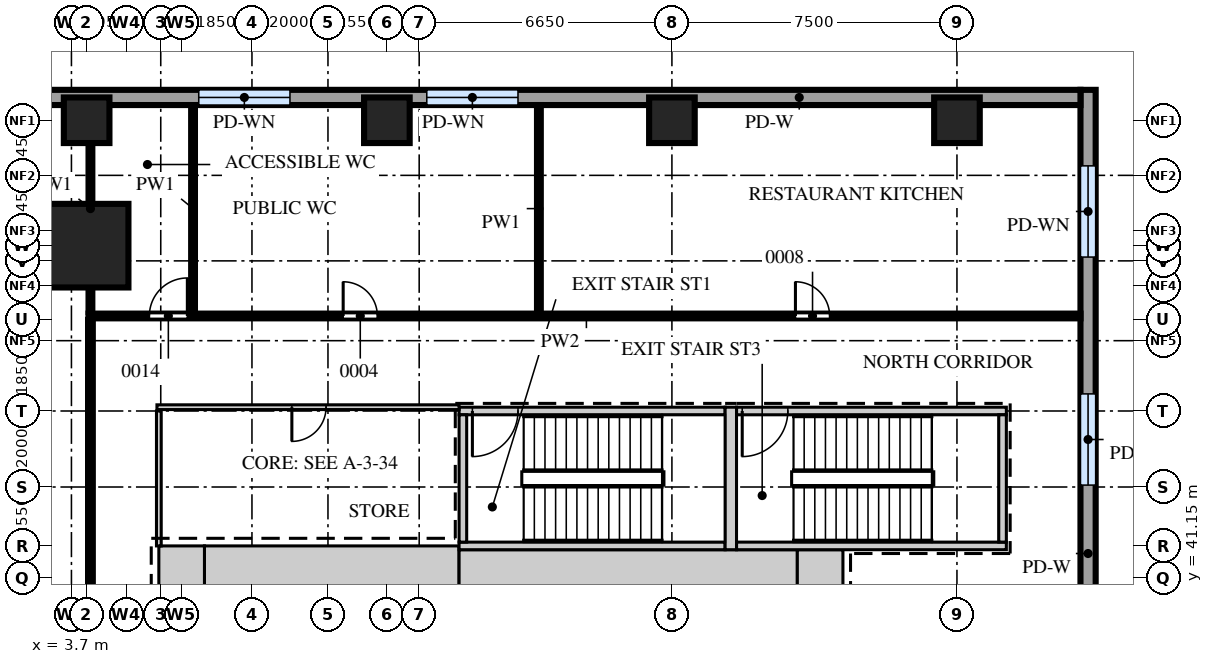
"""IFC4 building model, lengths in metres.
Left out: names, types, materials, properties, quantities, classifications, styles, units other than length and angle.
Written with IfcOpenShell. Run it as: python <this file> out.ifc"""

import sys

from ifc_helpers import new_model, si_unit, direction, frame, frame_2d, origin, origin_2d, place, context, subcontext, project, spatial, rectangle, extrude, source, transform, mapped, element, fill, save


model = new_model("IFC4")
c1 = context("Model", 3, precision=1e-05, world=origin(), true_north=direction((0.0, 1.0)))
c2 = subcontext(c1, "Body", "Model", "MODEL_VIEW")
j1 = project(units=[si_unit("LENGTHUNIT", "METRE"), si_unit("PLANEANGLEUNIT", "RADIAN")], contexts=[c1])
p1 = place(None, origin())
s1 = spatial("IfcSite", under=j1, at=p1, CompositionType="ELEMENT")
p2 = place(p1, origin())
s2 = spatial("IfcBuilding", under=s1, at=p2, CompositionType="ELEMENT")
p3 = place(p2, frame((0.0, 0.0, 18.5)))
s3 = spatial("IfcBuildingStorey", under=s2, at=p3, CompositionType="ELEMENT", Elevation=18.5)
m1 = source(origin(), c2, "Body", "SweptSolid", [
    extrude(rectangle(XDim=6.7, YDim=1.2, at=frame_2d((3.35, 0.0))), origin(), (0.0, 0.0, 1.0), 4.7),
])
p4 = place(p3, frame((7.2, 41.4, 0.0), z_axis=(0.0, 0.0, 1.0), x_axis=(1.0, 0.0, 0.0)))
e1 = element("IfcWall", 1, at=p4, inside=s3, PredefinedType="SHEAR", context=c2, shape_type="MappedRepresentation", body=[
    mapped(m1, transform((0.0, 0.0, 0.0))),
])
m2 = source(origin(), c2, "Body", "SweptSolid", [
    extrude(rectangle(XDim=8.9, YDim=1.1, at=frame_2d((4.45, 0.0))), origin(), (0.0, 0.0, 1.0), 4.7),
])
p5 = place(p3, frame((13.9, 41.35, 0.0), z_axis=(0.0, 0.0, 1.0), x_axis=(1.0, 0.0, 0.0)))
e2 = element("IfcWall", 2, at=p5, inside=s3, PredefinedType="SHEAR", context=c2, shape_type="MappedRepresentation", body=[
    mapped(m2, transform((0.0, 0.0, 0.0))),
])
m3 = source(origin(), c2, "Body", "SweptSolid", [
    extrude(rectangle(XDim=1.2, YDim=1.1, at=frame_2d((0.6, 0.0))), origin(), (0.0, 0.0, 1.0), 4.7),
])
p6 = place(p3, frame((22.8, 41.35, 0.0), z_axis=(0.0, 0.0, 1.0), x_axis=(1.0, 0.0, 0.0)))
e3 = element("IfcWall", 3, at=p6, inside=s3, PredefinedType="SHEAR", context=c2, shape_type="MappedRepresentation", body=[
    mapped(m3, transform((0.0, 0.0, 0.0))),
])
m4 = source(origin(), c2, "Body", "SweptSolid", [
    extrude(rectangle(XDim=1.2, YDim=1.2, at=frame_2d((0.6, 0.0))), origin(), (0.0, 0.0, 1.0), 4.7),
])
p7 = place(p3, frame((6.0, 41.4, 0.0), z_axis=(0.0, 0.0, 1.0), x_axis=(1.0, 0.0, 0.0)))
e4 = element("IfcWall", 4, at=p7, inside=s3, PredefinedType="SHEAR", context=c2, shape_type="MappedRepresentation", body=[
    mapped(m4, transform((0.0, 0.0, 0.0))),
])
m5 = source(origin(), c2, "Body", "SweptSolid", [
    extrude(rectangle(XDim=7.0, YDim=0.2, at=frame_2d((3.5, 0.0))), origin(), (0.0, 0.0, 1.0), 4.7),
])
p8 = place(p3, frame((13.9, 45.55, 0.0), z_axis=(0.0, 0.0, 1.0), x_axis=(1.0, 0.0, 0.0)))
e5 = element("IfcWall", 5, at=p8, inside=s3, PredefinedType="SHEAR", context=c2, shape_type="MappedRepresentation", body=[
    mapped(m5, transform((0.0, 0.0, 0.0))),
])
m6 = source(origin(), c2, "Body", "SweptSolid", [
    extrude(rectangle(XDim=1.2, YDim=2.1, at=frame_2d((0.6, 1.05))), frame((0.0, 0.11, 0.0), z_axis=(0.0, -1.0, 0.0), x_axis=(1.0, 0.0, 0.0)), (0.0, 0.0, 1.0), 0.22),
])
p9 = place(p8, frame((0.35, 0.0, 0.0)))
e6 = element("IfcOpeningElement", 6, at=p9, cuts=e5, PredefinedType="OPENING", context=c2, shape_type="MappedRepresentation", body=[
    mapped(m6, transform((0.0, 0.0, 0.0))),
])
p10 = place(p3, frame((13.9, 42.0, 0.0), z_axis=(0.0, 0.0, 1.0), x_axis=(1.0, 0.0, 0.0)))
e7 = element("IfcWall", 7, at=p10, inside=s3, PredefinedType="SHEAR", context=c2, shape_type="MappedRepresentation", body=[
    mapped(m5, transform((0.0, 0.0, 0.0))),
])
m7 = source(origin(), c2, "Body", "SweptSolid", [
    extrude(rectangle(XDim=7.1, YDim=0.2, at=frame_2d((3.55, 0.0))), origin(), (0.0, 0.0, 1.0), 4.7),
])
p11 = place(p3, frame((21.2, 45.55, 0.0), z_axis=(0.0, 0.0, 1.0), x_axis=(1.0, 0.0, 0.0)))
e8 = element("IfcWall", 8, at=p11, inside=s3, PredefinedType="SHEAR", context=c2, shape_type="MappedRepresentation", body=[
    mapped(m7, transform((0.0, 0.0, 0.0))),
])
p12 = place(p11, frame((0.15, 0.0, 0.0)))
e9 = element("IfcOpeningElement", 9, at=p12, cuts=e8, PredefinedType="OPENING", context=c2, shape_type="MappedRepresentation", body=[
    mapped(m6, transform((0.0, 0.0, 0.0))),
])
p13 = place(p3, frame((21.2, 42.0, 0.0), z_axis=(0.0, 0.0, 1.0), x_axis=(1.0, 0.0, 0.0)))
e10 = element("IfcWall", 10, at=p13, inside=s3, PredefinedType="SHEAR", context=c2, shape_type="MappedRepresentation", body=[
    mapped(m7, transform((0.0, 0.0, 0.0))),
])
m8 = source(origin(), c2, "Body", "SweptSolid", [
    extrude(rectangle(XDim=3.75, YDim=0.3, at=frame_2d((1.875, 0.0))), origin(), (0.0, 0.0, 1.0), 4.7),
])
p14 = place(p3, frame((21.05, 41.9, 0.0), z_axis=(0.0, 0.0, 1.0), x_axis=(0.0, 1.0, 0.0)))
e11 = element("IfcWall", 11, at=p14, inside=s3, PredefinedType="SHEAR", context=c2, shape_type="MappedRepresentation", body=[
    mapped(m8, transform((0.0, 0.0, 0.0))),
])
m9 = source(origin(), c2, "Body", "SweptSolid", [
    extrude(rectangle(XDim=3.35, YDim=0.2, at=frame_2d((1.675, 0.0))), origin(), (0.0, 0.0, 1.0), 4.7),
])
for number, where, z_axis, x_axis in (
    (12, (14.0, 42.1, 0.0), (0.0, 0.0, 1.0), (0.0, 1.0, 0.0)),
    (13, (28.2, 42.1, 0.0), (0.0, 0.0, 1.0), (0.0, 1.0, 0.0)),
):
    element("IfcWall", number, at=place(p3, frame(where, z_axis=z_axis, x_axis=x_axis)), inside=s3, PredefinedType="SHEAR", context=c2, shape_type="MappedRepresentation", body=[
        mapped(m9, transform((0.0, 0.0, 0.0))),
    ])
m10 = source(origin(), c2, "Body", "SweptSolid", [
    extrude(rectangle(XDim=2.2, YDim=2.2, at=origin_2d()), origin(), (0.0, 0.0, 1.0), 4.7),
])
p15 = place(p3, frame((4.1, 49.9, 0.0), z_axis=(0.0, 0.0, 1.0), x_axis=(1.0, 0.0, 0.0)))
e14 = element("IfcColumn", 14, at=p15, inside=s3, PredefinedType="COLUMN", context=c2, shape_type="MappedRepresentation", body=[
    mapped(m10, transform((0.0, 0.0, 0.0))),
])
m11 = source(origin(), c2, "Body", "SweptSolid", [
    extrude(rectangle(XDim=1.2, YDim=1.2, at=origin_2d()), origin(), (0.0, 0.0, 1.0), 4.7),
])
for number, where, z_axis, x_axis in (
    (15, (4.1, 53.2, 0.0), (0.0, 0.0, 1.0), (1.0, 0.0, 0.0)),
    (16, (12.0, 53.2, 0.0), (0.0, 0.0, 1.0), (1.0, 0.0, 0.0)),
    (17, (19.5, 53.2, 0.0), (0.0, 0.0, 1.0), (1.0, 0.0, 0.0)),
    (18, (27.0, 53.2, 0.0), (0.0, 0.0, 1.0), (1.0, 0.0, 0.0)),
):
    element("IfcColumn", number, at=place(p3, frame(where, z_axis=z_axis, x_axis=x_axis)), inside=s3, PredefinedType="COLUMN", context=c2, shape_type="MappedRepresentation", body=[
        mapped(m11, transform((0.0, 0.0, 0.0))),
    ])
m12 = source(origin(), c2, "Body", "SweptSolid", [
    extrude(rectangle(XDim=18.4, YDim=0.4, at=frame_2d((9.2, 0.0))), origin(), (0.0, 0.0, 1.0), 4.7),
])
p16 = place(p3, frame((30.45, 35.6, 0.0), z_axis=(0.0, 0.0, 1.0), x_axis=(0.0, 1.0, 0.0)))
e19 = element("IfcWall", 19, at=p16, inside=s3, PredefinedType="SOLIDWALL", context=c2, shape_type="MappedRepresentation", body=[
    mapped(m12, transform((0.0, 0.0, 0.0))),
])
m13 = source(origin(), c2, "Body", "SweptSolid", [
    extrude(rectangle(XDim=2.4, YDim=2.4, at=frame_2d((1.2, 1.2))), frame((0.0, 0.21, 0.0), z_axis=(0.0, -1.0, 0.0), x_axis=(1.0, 0.0, 0.0)), (0.0, 0.0, 1.0), 0.42),
])
p17 = place(p16, frame((2.0, 0.0, 1.0)))
e20 = element("IfcOpeningElement", 20, at=p17, cuts=e19, PredefinedType="OPENING", context=c2, shape_type="MappedRepresentation", body=[
    mapped(m13, transform((0.0, 0.0, 0.0))),
])
p18 = place(p16, frame((8.0, 0.0, 1.0)))
e21 = element("IfcOpeningElement", 21, at=p18, cuts=e19, PredefinedType="OPENING", context=c2, shape_type="MappedRepresentation", body=[
    mapped(m13, transform((0.0, 0.0, 0.0))),
])
p19 = place(p16, frame((14.0, 0.0, 1.0)))
e22 = element("IfcOpeningElement", 22, at=p19, cuts=e19, PredefinedType="OPENING", context=c2, shape_type="MappedRepresentation", body=[
    mapped(m13, transform((0.0, 0.0, 0.0))),
])
m14 = source(origin(), c2, "Body", "SweptSolid", [
    extrude(rectangle(XDim=32.04, YDim=0.4, at=frame_2d((16.02, 0.0))), origin(), (0.0, 0.0, 1.0), 4.7),
])
p20 = place(p3, frame((30.25, 53.8, 0.0), z_axis=(0.0, 0.0, 1.0), x_axis=(-1.0, 0.0, 0.0)))
e23 = element("IfcWall", 23, at=p20, inside=s3, PredefinedType="SOLIDWALL", context=c2, shape_type="MappedRepresentation", body=[
    mapped(m14, transform((0.0, 0.0, 0.0))),
])
p21 = place(p20, frame((14.8, 0.0, 1.0)))
e24 = element("IfcOpeningElement", 24, at=p21, cuts=e23, PredefinedType="OPENING", context=c2, shape_type="MappedRepresentation", body=[
    mapped(m13, transform((0.0, 0.0, 0.0))),
])
p22 = place(p20, frame((20.8, 0.0, 1.0)))
e25 = element("IfcOpeningElement", 25, at=p22, cuts=e23, PredefinedType="OPENING", context=c2, shape_type="MappedRepresentation", body=[
    mapped(m13, transform((0.0, 0.0, 0.0))),
])
m15 = source(origin(), c2, "Body", "SweptSolid", [
    extrude(rectangle(XDim=41.8, YDim=0.125, at=frame_2d((20.9, 0.0))), origin(), (0.0, 0.0, 1.0), 4.7),
])
p23 = place(p3, frame((4.2, 6.15, 0.0), z_axis=(0.0, 0.0, 1.0), x_axis=(0.0, 1.0, 0.0)))
e26 = element("IfcWall", 26, at=p23, inside=s3, PredefinedType="PARTITIONING", context=c2, shape_type="MappedRepresentation", body=[
    mapped(m15, transform((0.0, 0.0, 0.0))),
])
m16 = source(origin(), c2, "Body", "SweptSolid", [
    extrude(rectangle(XDim=1.2, YDim=2.1, at=frame_2d((0.6, 1.05))), frame((0.0, 0.073, 0.0), z_axis=(0.0, -1.0, 0.0), x_axis=(1.0, 0.0, 0.0)), (0.0, 0.0, 1.0), 0.145),
])
p24 = place(p23, frame((9.45, 0.0, 0.0)))
e27 = element("IfcOpeningElement", 27, at=p24, cuts=e26, PredefinedType="OPENING", context=c2, shape_type="MappedRepresentation", body=[
    mapped(m16, transform((0.0, 0.0, 0.0))),
])
p25 = place(p23, frame((28.05, 0.0, 0.0)))
e28 = element("IfcOpeningElement", 28, at=p25, cuts=e26, PredefinedType="OPENING", context=c2, shape_type="MappedRepresentation", body=[
    mapped(m16, transform((0.0, 0.0, 0.0))),
])
m17 = source(origin(), c2, "Body", "SweptSolid", [
    extrude(rectangle(XDim=3.55, YDim=0.125, at=frame_2d((1.775, 0.0))), origin(), (0.0, 0.0, 1.0), 4.7),
])
p26 = place(p3, frame((6.0, 42.0, 0.0), z_axis=(0.0, 0.0, 1.0), x_axis=(0.0, 1.0, 0.0)))
e29 = element("IfcWall", 29, at=p26, inside=s3, PredefinedType="PARTITIONING", context=c2, shape_type="MappedRepresentation", body=[
    mapped(m17, transform((0.0, 0.0, 0.0))),
])
m18 = source(origin(), c2, "Body", "SweptSolid", [
    extrude(rectangle(XDim=7.95, YDim=0.125, at=frame_2d((3.975, 0.0))), origin(), (0.0, 0.0, 1.0), 4.7),
])
p27 = place(p3, frame((5.95, 45.65, 0.0), z_axis=(0.0, 0.0, 1.0), x_axis=(1.0, 0.0, 0.0)))
e30 = element("IfcWall", 30, at=p27, inside=s3, PredefinedType="PARTITIONING", context=c2, shape_type="MappedRepresentation", body=[
    mapped(m18, transform((0.0, 0.0, 0.0))),
])
m19 = source(origin(), c2, "Body", "SweptSolid", [
    extrude(rectangle(XDim=0.9, YDim=2.1, at=frame_2d((0.45, 1.05))), frame((0.0, 0.073, 0.0), z_axis=(0.0, -1.0, 0.0), x_axis=(1.0, 0.0, 0.0)), (0.0, 0.0, 1.0), 0.145),
])
p28 = place(p27, frame((3.55, 0.0, 0.0)))
e31 = element("IfcOpeningElement", 31, at=p28, cuts=e30, PredefinedType="OPENING", context=c2, shape_type="MappedRepresentation", body=[
    mapped(m19, transform((0.0, 0.0, 0.0))),
])
m20 = source(origin(), c2, "Body", "SweptSolid", [
    extrude(rectangle(XDim=26.1, YDim=0.125, at=frame_2d((13.05, 0.0))), origin(), (0.0, 0.0, 1.0), 4.7),
])
p29 = place(p3, frame((4.15, 48.05, 0.0), z_axis=(0.0, 0.0, 1.0), x_axis=(1.0, 0.0, 0.0)))
e32 = element("IfcWall", 32, at=p29, inside=s3, PredefinedType="PARTITIONING", context=c2, shape_type="MappedRepresentation", body=[
    mapped(m20, transform((0.0, 0.0, 0.0))),
])
m21 = source(origin(), c2, "Body", "SweptSolid", [
    extrude(rectangle(XDim=1.0, YDim=2.1, at=frame_2d((0.5, 1.05))), frame((0.0, 0.073, 0.0), z_axis=(0.0, -1.0, 0.0), x_axis=(1.0, 0.0, 0.0)), (0.0, 0.0, 1.0), 0.145),
])
p30 = place(p29, frame((1.6, 0.0, 0.0)))
e33 = element("IfcOpeningElement", 33, at=p30, cuts=e32, PredefinedType="OPENING", context=c2, shape_type="MappedRepresentation", body=[
    mapped(m21, transform((0.0, 0.0, 0.0))),
])
p31 = place(p29, frame((6.7, 0.0, 0.0)))
e34 = element("IfcOpeningElement", 34, at=p31, cuts=e32, PredefinedType="OPENING", context=c2, shape_type="MappedRepresentation", body=[
    mapped(m19, transform((0.0, 0.0, 0.0))),
])
p32 = place(p29, frame((18.6, 0.0, 0.0)))
e35 = element("IfcOpeningElement", 35, at=p32, cuts=e32, PredefinedType="OPENING", context=c2, shape_type="MappedRepresentation", body=[
    mapped(m19, transform((0.0, 0.0, 0.0))),
])
m22 = source(origin(), c2, "Body", "SweptSolid", [
    extrude(rectangle(XDim=5.45, YDim=0.1, at=frame_2d((2.725, 0.0))), origin(), (0.0, 0.0, 1.0), 4.7),
])
for number, where, z_axis, x_axis in (
    (36, (4.2, 48.15, 0.0), (0.0, 0.0, 1.0), (0.0, 1.0, 0.0)),
    (37, (6.9, 48.15, 0.0), (0.0, 0.0, 1.0), (0.0, 1.0, 0.0)),
    (38, (16.0, 48.15, 0.0), (0.0, 0.0, 1.0), (0.0, 1.0, 0.0)),
):
    element("IfcWall", number, at=place(p3, frame(where, z_axis=z_axis, x_axis=x_axis)), inside=s3, PredefinedType="PARTITIONING", context=c2, shape_type="MappedRepresentation", body=[
        mapped(m22, transform((0.0, 0.0, 0.0))),
    ])
m23 = source(origin(), c2, "Body", "SweptSolid", [
    extrude(rectangle(XDim=2.4, YDim=2.4, at=frame_2d((1.2, 1.2))), frame((0.0, 0.03, 0.0), z_axis=(0.0, -1.0, 0.0), x_axis=(1.0, 0.0, 0.0)), (0.0, 0.0, 1.0), 0.06),
])
p33 = place(p18, origin())
e39 = element("IfcWindow", 39, at=p33, inside=s3, PartitioningType="SINGLE_PANEL", PredefinedType="WINDOW", context=c2, shape_type="MappedRepresentation", body=[
    mapped(m23, transform((0.0, 0.0, 0.0))),
])
fill(e21, e39)
p34 = place(p19, origin())
e40 = element("IfcWindow", 40, at=p34, inside=s3, PartitioningType="SINGLE_PANEL", PredefinedType="WINDOW", context=c2, shape_type="MappedRepresentation", body=[
    mapped(m23, transform((0.0, 0.0, 0.0))),
])
fill(e22, e40)
p35 = place(p21, origin())
e41 = element("IfcWindow", 41, at=p35, inside=s3, PartitioningType="SINGLE_PANEL", PredefinedType="WINDOW", context=c2, shape_type="MappedRepresentation", body=[
    mapped(m23, transform((0.0, 0.0, 0.0))),
])
fill(e24, e41)
p36 = place(p22, origin())
e42 = element("IfcWindow", 42, at=p36, inside=s3, PartitioningType="SINGLE_PANEL", PredefinedType="WINDOW", context=c2, shape_type="MappedRepresentation", body=[
    mapped(m23, transform((0.0, 0.0, 0.0))),
])
fill(e25, e42)
m24 = source(origin(), c2, "Body", "SweptSolid", [
    extrude(rectangle(XDim=1.0, YDim=2.1, at=frame_2d((0.5, 1.05))), frame((0.0, 0.025, 0.0), z_axis=(0.0, -1.0, 0.0), x_axis=(1.0, 0.0, 0.0)), (0.0, 0.0, 1.0), 0.05),
])
p37 = place(p30, origin())
e43 = element("IfcDoor", 43, at=p37, inside=s3, OperationType="SINGLE_SWING_LEFT", PredefinedType="DOOR", context=c2, shape_type="MappedRepresentation", body=[
    mapped(m24, transform((0.0, 0.0, 0.0))),
])
fill(e33, e43)
m25 = source(origin(), c2, "Body", "SweptSolid", [
    extrude(rectangle(XDim=0.9, YDim=2.1, at=frame_2d((0.45, 1.05))), frame((0.0, 0.025, 0.0), z_axis=(0.0, -1.0, 0.0), x_axis=(1.0, 0.0, 0.0)), (0.0, 0.0, 1.0), 0.05),
])
p38 = place(p31, origin())
e44 = element("IfcDoor", 44, at=p38, inside=s3, OperationType="SINGLE_SWING_RIGHT", PredefinedType="DOOR", context=c2, shape_type="MappedRepresentation", body=[
    mapped(m25, transform((0.0, 0.0, 0.0))),
])
fill(e34, e44)
p39 = place(p32, origin())
e45 = element("IfcDoor", 45, at=p39, inside=s3, OperationType="SINGLE_SWING_RIGHT", PredefinedType="DOOR", context=c2, shape_type="MappedRepresentation", body=[
    mapped(m25, transform((0.0, 0.0, 0.0))),
])
fill(e35, e45)
p40 = place(p28, origin())
e46 = element("IfcDoor", 46, at=p40, inside=s3, OperationType="SINGLE_SWING_LEFT", PredefinedType="DOOR", context=c2, shape_type="MappedRepresentation", body=[
    mapped(m25, transform((0.0, 0.0, 0.0))),
])
fill(e31, e46)
m26 = source(origin(), c2, "Body", "SweptSolid", [
    extrude(rectangle(XDim=1.2, YDim=2.1, at=frame_2d((0.6, 1.05))), frame((0.0, 0.025, 0.0), z_axis=(0.0, -1.0, 0.0), x_axis=(1.0, 0.0, 0.0)), (0.0, 0.0, 1.0), 0.05),
])
p41 = place(p9, origin())
e47 = element("IfcDoor", 47, at=p41, inside=s3, OperationType="SINGLE_SWING_LEFT", PredefinedType="DOOR", context=c2, shape_type="MappedRepresentation", body=[
    mapped(m26, transform((0.0, 0.0, 0.0))),
])
fill(e6, e47)
p42 = place(p12, origin())
e48 = element("IfcDoor", 48, at=p42, inside=s3, OperationType="SINGLE_SWING_LEFT", PredefinedType="DOOR", context=c2, shape_type="MappedRepresentation", body=[
    mapped(m26, transform((0.0, 0.0, 0.0))),
])
fill(e9, e48)
save(model, sys.argv[1])
